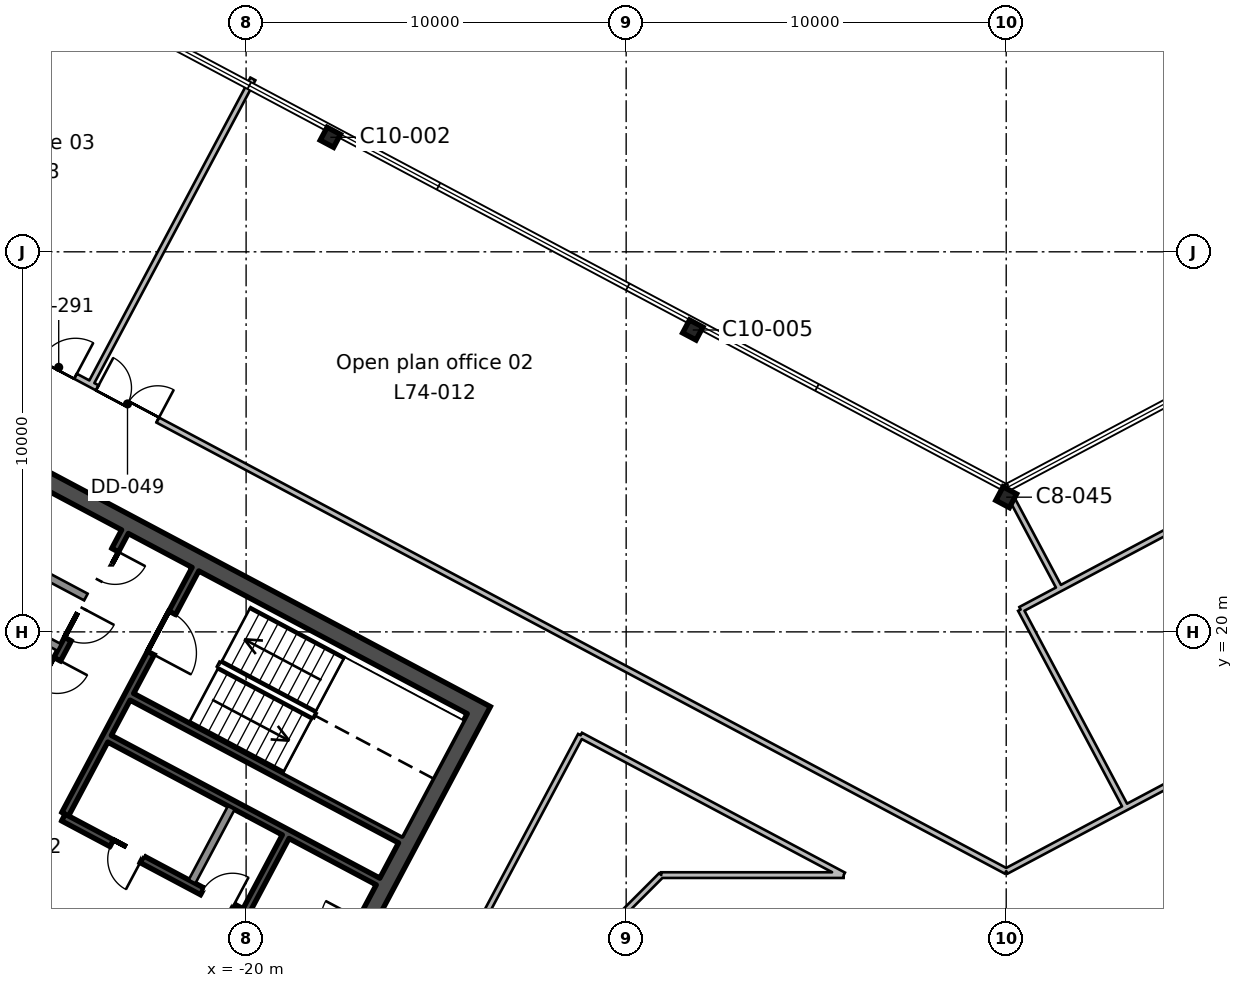
"""IFC4 building model, lengths in metres.
Left out: names, types, materials, properties, quantities, classifications, styles, units other than length and angle.
Written with IfcOpenShell. Run it as: python <this file> out.ifc"""

import sys

from ifc_helpers import new_model, si_unit, direction, frame, frame_2d, origin, origin_2d, place, context, subcontext, project, spatial, rectangle, i_section, extrude, element, fill, save


model = new_model("IFC4")
c1 = context("Model", 3, precision=1e-05, world=origin(), true_north=direction((0.0, 1.0)))
c2 = subcontext(c1, "Body", "Model", "MODEL_VIEW")
j1 = project(units=[si_unit("LENGTHUNIT", "METRE"), si_unit("PLANEANGLEUNIT", "RADIAN")], contexts=[c1])
p1 = place(None, origin())
s1 = spatial("IfcSite", under=j1, at=p1, CompositionType="ELEMENT")
p2 = place(p1, origin())
s2 = spatial("IfcBuilding", under=s1, at=p2, CompositionType="ELEMENT")
p3 = place(p2, frame((0.0, 0.0, 324.3)))
s3 = spatial("IfcBuildingStorey", under=s2, at=p3, CompositionType="ELEMENT", Elevation=324.3)
p4 = place(p3, frame((0.0, 23.544, 0.0), z_axis=(0.0, 0.0, 1.0), x_axis=(-0.882947592859, 0.469471562786, 0.0)))
e1 = element("IfcColumn", 1, at=p4, inside=s3, PredefinedType="COLUMN", context=c2, shape_type="SweptSolid", body=[
    extrude(i_section(OverallWidth=0.404, OverallDepth=0.406, WebThickness=0.027, FlangeThickness=0.044, FilletRadius=0.015, at=origin_2d()), origin(), (0.0, 0.0, 1.0), 3.9),
])
for number, where, z_axis, x_axis in (
    (2, (-8.247, 27.943, 0.0), (0.0, 0.0, 1.0), (-0.883, 0.469, 0.0)),
    (3, (-17.783, 33.013, 0.0), (0.0, 0.0, 1.0), (-0.883, 0.469, 0.0)),
):
    element("IfcColumn", number, at=place(p3, frame(where, z_axis=z_axis, x_axis=x_axis)), inside=s3, PredefinedType="COLUMN", context=c2, shape_type="SweptSolid", body=[
        extrude(i_section(OverallWidth=0.399, OverallDepth=0.386, WebThickness=0.021, FlangeThickness=0.033, FilletRadius=0.015, at=origin_2d()), origin(), (0.0, 0.0, 1.0), 3.9),
    ])
p5 = place(p3, frame((-13.771, 18.138, 0.0), z_axis=(0.0, 0.0, 1.0), x_axis=(-0.469467968382, -0.882949504028, 0.0)))
e4 = element("IfcWall", 4, at=p5, inside=s3, PredefinedType="SHEAR", context=c2, shape_type="SweptSolid", body=[
    extrude(rectangle(XDim=19.1, YDim=0.45, at=frame_2d((9.55, 0.0))), origin(), (0.0, 0.0, 1.0), 3.9),
])
p6 = place(p5, frame((6.55, 0.0, 0.0)))
e5 = element("IfcOpeningElement", 5, at=p6, cuts=e4, PredefinedType="OPENING", context=c2, shape_type="SweptSolid", body=[
    extrude(rectangle(XDim=2.4, YDim=2.4, at=frame_2d((1.2, 1.2))), frame((0.0, 0.235, 0.0), z_axis=(0.0, -1.0, 0.0), x_axis=(1.0, 0.0, 0.0)), (0.0, 0.0, 1.0), 0.47),
])
p7 = place(p3, frame((-14.076, 18.045, 0.0), z_axis=(0.0, 0.0, 1.0), x_axis=(-0.882947755831, 0.46947125628, 0.0)))
e6 = element("IfcWall", 6, at=p7, inside=s3, PredefinedType="SHEAR", context=c2, shape_type="SweptSolid", body=[
    extrude(rectangle(XDim=20.2, YDim=0.45, at=frame_2d((10.1, 0.0))), origin(), (0.0, 0.0, 1.0), 3.9),
])
p8 = place(p3, frame((-18.96, 14.611, 0.0), z_axis=(0.0, 0.0, 1.0), x_axis=(-0.4694473164, -0.882960484464, 0.0)))
e7 = element("IfcWall", 7, at=p8, inside=s3, PredefinedType="SHEAR", context=c2, shape_type="SweptSolid", body=[
    extrude(rectangle(XDim=2.2, YDim=0.2, at=frame_2d((1.1, 0.0))), origin(), (0.0, 0.0, 1.0), 3.9),
])
p9 = place(p3, frame((-20.39, 15.372, 0.0), z_axis=(0.0, 0.0, 1.0), x_axis=(-0.4694473164, -0.882960484464, 0.0)))
e8 = element("IfcWall", 8, at=p9, inside=s3, PredefinedType="SOLIDWALL", context=c2, shape_type="SweptSolid", body=[
    extrude(rectangle(XDim=2.2, YDim=0.2, at=frame_2d((1.1, 0.0))), origin(), (0.0, 0.0, 1.0), 3.9),
])
p10 = place(p3, frame((-21.333, 21.649, 0.0), z_axis=(0.0, 0.0, 1.0), x_axis=(-0.469494272526, -0.882935517501, 0.0)))
e9 = element("IfcWall", 9, at=p10, inside=s3, PredefinedType="SHEAR", context=c2, shape_type="SweptSolid", body=[
    extrude(rectangle(XDim=7.3, YDim=0.2, at=frame_2d((3.65, 0.0))), origin(), (0.0, 0.0, 1.0), 3.9),
])
p11 = place(p10, frame((1.3, 0.0, 0.0)))
e10 = element("IfcOpeningElement", 10, at=p11, cuts=e9, PredefinedType="OPENING", context=c2, shape_type="SweptSolid", body=[
    extrude(rectangle(XDim=1.2, YDim=2.1, at=frame_2d((0.6, 1.05))), frame((0.0, 0.11, 0.0), z_axis=(0.0, -1.0, 0.0), x_axis=(1.0, 0.0, 0.0)), (0.0, 0.0, 1.0), 0.22),
])
p12 = place(p3, frame((-23.188, 22.635, 0.0), z_axis=(0.0, 0.0, 1.0), x_axis=(-0.469454336211, -0.882956752176, 0.0)))
e11 = element("IfcWall", 11, at=p12, inside=s3, PredefinedType="SHEAR", context=c2, shape_type="SweptSolid", body=[
    extrude(rectangle(XDim=7.3, YDim=0.2, at=frame_2d((3.65, 0.0))), origin(), (0.0, 0.0, 1.0), 3.9),
])
p13 = place(p12, frame((0.55, 0.0, 0.0)))
e12 = element("IfcOpeningElement", 12, at=p13, cuts=e11, PredefinedType="OPENING", context=c2, shape_type="SweptSolid", body=[
    extrude(rectangle(XDim=0.9, YDim=2.1, at=frame_2d((0.45, 1.05))), frame((0.0, 0.11, 0.0), z_axis=(0.0, -1.0, 0.0), x_axis=(1.0, 0.0, 0.0)), (0.0, 0.0, 1.0), 0.22),
])
p14 = place(p12, frame((2.3, 0.0, 0.0)))
e13 = element("IfcOpeningElement", 13, at=p14, cuts=e11, PredefinedType="OPENING", context=c2, shape_type="SweptSolid", body=[
    extrude(rectangle(XDim=0.9, YDim=2.1, at=frame_2d((0.45, 1.05))), frame((0.0, 0.11, 0.0), z_axis=(0.0, -1.0, 0.0), x_axis=(1.0, 0.0, 0.0)), (0.0, 0.0, 1.0), 0.22),
])
p15 = place(p12, frame((3.8, 0.0, 0.0)))
e14 = element("IfcOpeningElement", 14, at=p15, cuts=e11, PredefinedType="OPENING", context=c2, shape_type="SweptSolid", body=[
    extrude(rectangle(XDim=0.9, YDim=2.1, at=frame_2d((0.45, 1.05))), frame((0.0, 0.11, 0.0), z_axis=(0.0, -1.0, 0.0), x_axis=(1.0, 0.0, 0.0)), (0.0, 0.0, 1.0), 0.22),
])
p16 = place(p3, frame((-24.215, 20.917, 0.0), z_axis=(0.0, 0.0, 1.0), x_axis=(-0.882964314875, 0.469440111896, 0.0)))
e15 = element("IfcWall", 15, at=p16, inside=s3, PredefinedType="SOLIDWALL", context=c2, shape_type="SweptSolid", body=[
    extrude(rectangle(XDim=5.2, YDim=0.2, at=frame_2d((2.6, 0.0))), origin(), (0.0, 0.0, 1.0), 3.9),
])
p17 = place(p3, frame((-24.919, 19.592, 0.0), z_axis=(0.0, 0.0, 1.0), x_axis=(-0.882953967957, 0.469459572775, 0.0)))
e16 = element("IfcWall", 16, at=p17, inside=s3, PredefinedType="SOLIDWALL", context=c2, shape_type="SweptSolid", body=[
    extrude(rectangle(XDim=5.2, YDim=0.2, at=frame_2d((2.6, 0.0))), origin(), (0.0, 0.0, 1.0), 3.9),
])
p18 = place(p3, frame((-15.942, 14.536, 0.0), z_axis=(0.0, 0.0, 1.0), x_axis=(-0.882946947542, 0.469472776449, 0.0)))
e17 = element("IfcWall", 17, at=p18, inside=s3, PredefinedType="SHEAR", context=c2, shape_type="SweptSolid", body=[
    extrude(rectangle(XDim=8.0, YDim=0.2, at=frame_2d((4.0, 0.0))), origin(), (0.0, 0.0, 1.0), 3.9),
])
p19 = place(p3, frame((-16.529, 13.432, 0.0), z_axis=(0.0, 0.0, 1.0), x_axis=(-0.88295287151, 0.469461634952, 0.0)))
e18 = element("IfcWall", 18, at=p19, inside=s3, PredefinedType="SHEAR", context=c2, shape_type="SweptSolid", body=[
    extrude(rectangle(XDim=8.0, YDim=0.2, at=frame_2d((4.0, 0.0))), origin(), (0.0, 0.0, 1.0), 3.9),
])
p20 = place(p3, frame((-20.04, 12.581, 0.0), z_axis=(0.0, 0.0, 1.0), x_axis=(-0.882942972946, 0.469480251476, 0.0)))
e19 = element("IfcWall", 19, at=p20, inside=s3, PredefinedType="SHEAR", context=c2, shape_type="SweptSolid", body=[
    extrude(rectangle(XDim=5.4, YDim=0.2, at=frame_2d((2.7, 0.0))), origin(), (0.0, 0.0, 1.0), 3.9),
])
p21 = place(p20, frame((0.36, 0.0, 0.0)))
e20 = element("IfcOpeningElement", 20, at=p21, cuts=e19, PredefinedType="OPENING", context=c2, shape_type="SweptSolid", body=[
    extrude(rectangle(XDim=0.9, YDim=2.1, at=frame_2d((0.45, 1.05))), frame((0.0, 0.11, 0.0), z_axis=(0.0, -1.0, 0.0), x_axis=(1.0, 0.0, 0.0)), (0.0, 0.0, 1.0), 0.22),
])
p22 = place(p20, frame((3.06, 0.0, 0.0)))
e21 = element("IfcOpeningElement", 21, at=p22, cuts=e19, PredefinedType="OPENING", context=c2, shape_type="SweptSolid", body=[
    extrude(rectangle(XDim=0.9, YDim=2.1, at=frame_2d((0.45, 1.05))), frame((0.0, 0.11, 0.0), z_axis=(0.0, -1.0, 0.0), x_axis=(1.0, 0.0, 0.0)), (0.0, 0.0, 1.0), 0.22),
])
p23 = place(p3, frame((-19.252, 8.311, 0.0), z_axis=(0.0, 0.0, 1.0), x_axis=(-0.882955722218, 0.469456273365, 0.0)))
e22 = element("IfcWall", 22, at=p23, inside=s3, PredefinedType="SHEAR", context=c2, shape_type="SweptSolid", body=[
    extrude(rectangle(XDim=10.0, YDim=0.2, at=frame_2d((5.0, 0.0))), origin(), (0.0, 0.0, 1.0), 3.9),
])
p24 = place(p23, frame((2.1, 0.0, 0.0)))
e23 = element("IfcOpeningElement", 23, at=p24, cuts=e22, PredefinedType="OPENING", context=c2, shape_type="SweptSolid", body=[
    extrude(rectangle(XDim=1.2, YDim=2.1, at=frame_2d((0.6, 1.05))), frame((0.0, 0.11, 0.0), z_axis=(0.0, -1.0, 0.0), x_axis=(1.0, 0.0, 0.0)), (0.0, 0.0, 1.0), 0.22),
])
p25 = place(p23, frame((5.4, 0.0, 0.0)))
e24 = element("IfcOpeningElement", 24, at=p25, cuts=e22, PredefinedType="OPENING", context=c2, shape_type="SweptSolid", body=[
    extrude(rectangle(XDim=1.1, YDim=2.1, at=frame_2d((0.55, 1.05))), frame((0.0, 0.11, 0.0), z_axis=(0.0, -1.0, 0.0), x_axis=(1.0, 0.0, 0.0)), (0.0, 0.0, 1.0), 0.22),
])
p26 = place(p23, frame((8.1, 0.0, 0.0)))
e25 = element("IfcOpeningElement", 25, at=p26, cuts=e22, PredefinedType="OPENING", context=c2, shape_type="SweptSolid", body=[
    extrude(rectangle(XDim=1.1, YDim=2.1, at=frame_2d((0.55, 1.05))), frame((0.0, 0.11, 0.0), z_axis=(0.0, -1.0, 0.0), x_axis=(1.0, 0.0, 0.0)), (0.0, 0.0, 1.0), 0.22),
])
p27 = place(p3, frame((-48.947, 39.73, 0.0), z_axis=(0.0, 0.0, 1.0), x_axis=(0.882945454821, -0.469475583828, 0.0)))
e26 = element("IfcWall", 26, at=p27, inside=s3, PredefinedType="PARTITIONING", context=c2, shape_type="SweptSolid", body=[
    extrude(rectangle(XDim=55.436, YDim=0.15, at=frame_2d((27.718, 0.0))), origin(), (0.0, 0.0, 1.0), 3.5),
])
p28 = place(p27, frame((28.35, 0.0, 0.0)))
e27 = element("IfcOpeningElement", 27, at=p28, cuts=e26, PredefinedType="OPENING", context=c2, shape_type="SweptSolid", body=[
    extrude(rectangle(XDim=1.8, YDim=2.1, at=frame_2d((0.9, 1.05))), frame((0.0, 0.085, 0.0), z_axis=(0.0, -1.0, 0.0), x_axis=(1.0, 0.0, 0.0)), (0.0, 0.0, 1.0), 0.17),
])
p29 = place(p27, frame((26.7, 0.0, 0.0)))
e28 = element("IfcOpeningElement", 28, at=p29, cuts=e26, PredefinedType="OPENING", context=c2, shape_type="SweptSolid", body=[
    extrude(rectangle(XDim=1.0, YDim=2.1, at=frame_2d((0.5, 1.05))), frame((0.0, 0.085, 0.0), z_axis=(0.0, -1.0, 0.0), x_axis=(1.0, 0.0, 0.0)), (0.0, 0.0, 1.0), 0.17),
])
p30 = place(p27, frame((15.65, 0.0, 0.0)))
e29 = element("IfcOpeningElement", 29, at=p30, cuts=e26, PredefinedType="OPENING", context=c2, shape_type="SweptSolid", body=[
    extrude(rectangle(XDim=1.0, YDim=2.1, at=frame_2d((0.5, 1.05))), frame((0.0, 0.085, 0.0), z_axis=(0.0, -1.0, 0.0), x_axis=(1.0, 0.0, 0.0)), (0.0, 0.0, 1.0), 0.17),
])
p31 = place(p3, frame((0.0, 13.704, 0.0), z_axis=(0.0, 0.0, 1.0), x_axis=(0.882954463269, 0.469458641196, 0.0)))
e30 = element("IfcWall", 30, at=p31, inside=s3, PredefinedType="PARTITIONING", context=c2, shape_type="SweptSolid", body=[
    extrude(rectangle(XDim=33.766, YDim=0.15, at=frame_2d((16.883, 0.0))), origin(), (0.0, 0.0, 1.0), 3.5),
])
p32 = place(p31, frame((15.95, 0.0, 0.0)))
e31 = element("IfcOpeningElement", 31, at=p32, cuts=e30, PredefinedType="OPENING", context=c2, shape_type="SweptSolid", body=[
    extrude(rectangle(XDim=1.8, YDim=2.1, at=frame_2d((0.9, 1.05))), frame((0.0, 0.085, 0.0), z_axis=(0.0, -1.0, 0.0), x_axis=(1.0, 0.0, 0.0)), (0.0, 0.0, 1.0), 0.17),
])
p33 = place(p3, frame((-19.822, 34.55, 0.0), z_axis=(0.0, 0.0, 1.0), x_axis=(-0.46943766298, -0.882965616871, 0.0)))
e32 = element("IfcWall", 32, at=p33, inside=s3, PredefinedType="PARTITIONING", context=c2, shape_type="SweptSolid", body=[
    extrude(rectangle(XDim=9.1, YDim=0.15, at=frame_2d((4.55, 0.0))), origin(), (0.0, 0.0, 1.0), 3.5),
])
p34 = place(p3, frame((2.487, 16.624, 0.0), z_axis=(0.0, 0.0, 1.0), x_axis=(0.469087751625, -0.883151561894, 0.0)))
e33 = element("IfcWall", 33, at=p34, inside=s3, PredefinedType="PARTITIONING", context=c2, shape_type="SweptSolid", body=[
    extrude(rectangle(XDim=1.411, YDim=0.15, at=frame_2d((0.706, 0.0))), origin(), (0.0, 0.0, 1.0), 3.5),
])
p35 = place(p3, frame((0.178, 23.45, 0.0), z_axis=(0.0, 0.0, 1.0), x_axis=(0.469495603372, -0.882934809833, 0.0)))
e34 = element("IfcWall", 34, at=p35, inside=s3, PredefinedType="PARTITIONING", context=c2, shape_type="SweptSolid", body=[
    extrude(rectangle(XDim=2.622, YDim=0.15, at=frame_2d((1.311, 0.0))), origin(), (0.0, 0.0, 1.0), 3.5),
])
p36 = place(p3, frame((1.405, 21.133, 0.0), z_axis=(0.0, 0.0, 1.0), x_axis=(0.882938487938, 0.46948868625, 0.0)))
e35 = element("IfcWall", 35, at=p36, inside=s3, PredefinedType="PARTITIONING", context=c2, shape_type="SweptSolid", body=[
    extrude(rectangle(XDim=22.837, YDim=0.15, at=frame_2d((11.419, 0.0))), origin(), (0.0, 0.0, 1.0), 3.5),
])
p37 = place(p3, frame((2.487, 16.624, 0.0), z_axis=(0.0, 0.0, 1.0), x_axis=(-0.469563370993, 0.882898771447, 0.0)))
e36 = element("IfcWall", 36, at=p37, inside=s3, PredefinedType="PARTITIONING", context=c2, shape_type="SweptSolid", body=[
    extrude(rectangle(XDim=4.49, YDim=0.15, at=frame_2d((2.245, 0.0))), origin(), (0.0, 0.0, 1.0), 3.5),
])
p38 = place(p3, frame((1.405, 21.133, 0.0), z_axis=(0.0, 0.0, 1.0), x_axis=(-0.882753784089, -0.469835882704, 0.0)))
e37 = element("IfcWall", 37, at=p38, inside=s3, PredefinedType="PARTITIONING", context=c2, shape_type="SweptSolid", body=[
    extrude(rectangle(XDim=1.162, YDim=0.15, at=frame_2d((0.581, 0.0))), origin(), (0.0, 0.0, 1.0), 3.5),
])
p39 = place(p3, frame((-20.588, -0.379, 0.0), z_axis=(0.0, 0.0, 1.0), x_axis=(0.469489882812, 0.882937851685, 0.0)))
e38 = element("IfcWall", 38, at=p39, inside=s3, PredefinedType="PARTITIONING", context=c2, shape_type="SweptSolid", body=[
    extrude(rectangle(XDim=20.0, YDim=0.15, at=frame_2d((10.0, 0.0))), origin(), (0.0, 0.0, 1.0), 3.5),
])
p40 = place(p39, frame((9.55, 0.0, 0.0)))
e39 = element("IfcOpeningElement", 39, at=p40, cuts=e38, PredefinedType="OPENING", context=c2, shape_type="SweptSolid", body=[
    extrude(rectangle(XDim=1.0, YDim=2.1, at=frame_2d((0.5, 1.05))), frame((0.0, 0.085, 0.0), z_axis=(0.0, -1.0, 0.0), x_axis=(1.0, 0.0, 0.0)), (0.0, 0.0, 1.0), 0.17),
])
p41 = place(p3, frame((-11.198, 17.28, 0.0), z_axis=(0.0, 0.0, 1.0), x_axis=(0.882946288452, -0.46947401601, 0.0)))
e40 = element("IfcWall", 40, at=p41, inside=s3, PredefinedType="PARTITIONING", context=c2, shape_type="SweptSolid", body=[
    extrude(rectangle(XDim=7.838, YDim=0.15, at=frame_2d((3.919, 0.0))), origin(), (0.0, 0.0, 1.0), 3.5),
])
p42 = place(p3, frame((-4.277, 13.6, 0.0), z_axis=(0.0, 0.0, 1.0), x_axis=(-1.0, 0.0, 0.0)))
e41 = element("IfcWall", 41, at=p42, inside=s3, PredefinedType="PARTITIONING", context=c2, shape_type="SweptSolid", body=[
    extrude(rectangle(XDim=4.8, YDim=0.15, at=frame_2d((2.4, 0.0))), origin(), (0.0, 0.0, 1.0), 3.5),
])
p43 = place(p3, frame((-9.077, 13.6, 0.0), z_axis=(0.0, 0.0, 1.0), x_axis=(-0.707106781187, -0.707106781187, 0.0)))
e42 = element("IfcWall", 42, at=p43, inside=s3, PredefinedType="PARTITIONING", context=c2, shape_type="SweptSolid", body=[
    extrude(rectangle(XDim=6.397, YDim=0.15, at=frame_2d((3.198, 0.0))), origin(), (0.0, 0.0, 1.0), 3.5),
])
p44 = place(p11, origin())
e43 = element("IfcDoor", 43, at=p44, inside=s3, OperationType="SINGLE_SWING_RIGHT", PredefinedType="DOOR", context=c2, shape_type="SweptSolid", body=[
    extrude(rectangle(XDim=1.2, YDim=2.1, at=frame_2d((0.6, 1.05))), frame((0.0, 0.025, 0.0), z_axis=(0.0, -1.0, 0.0), x_axis=(1.0, 0.0, 0.0)), (0.0, 0.0, 1.0), 0.05),
])
fill(e10, e43)
p45 = place(p21, frame((0.9, 0.0, 0.0), z_axis=(0.0, 0.0, 1.0), x_axis=(-1.0, 0.0, 0.0)))
e44 = element("IfcDoor", 44, at=p45, inside=s3, OperationType="SINGLE_SWING_RIGHT", PredefinedType="DOOR", context=c2, shape_type="SweptSolid", body=[
    extrude(rectangle(XDim=0.9, YDim=2.1, at=frame_2d((0.45, 1.05))), frame((0.0, 0.025, 0.0), z_axis=(0.0, -1.0, 0.0), x_axis=(1.0, 0.0, 0.0)), (0.0, 0.0, 1.0), 0.05),
])
fill(e20, e44)
p46 = place(p22, origin())
e45 = element("IfcDoor", 45, at=p46, inside=s3, OperationType="SINGLE_SWING_LEFT", PredefinedType="DOOR", context=c2, shape_type="SweptSolid", body=[
    extrude(rectangle(XDim=0.9, YDim=2.1, at=frame_2d((0.45, 1.05))), frame((0.0, 0.025, 0.0), z_axis=(0.0, -1.0, 0.0), x_axis=(1.0, 0.0, 0.0)), (0.0, 0.0, 1.0), 0.05),
])
fill(e21, e45)
p47 = place(p13, origin())
e46 = element("IfcDoor", 46, at=p47, inside=s3, OperationType="SINGLE_SWING_LEFT", PredefinedType="DOOR", context=c2, shape_type="SweptSolid", body=[
    extrude(rectangle(XDim=0.9, YDim=2.1, at=frame_2d((0.45, 1.05))), frame((0.0, 0.025, 0.0), z_axis=(0.0, -1.0, 0.0), x_axis=(1.0, 0.0, 0.0)), (0.0, 0.0, 1.0), 0.05),
])
fill(e12, e46)
p48 = place(p14, origin())
e47 = element("IfcDoor", 47, at=p48, inside=s3, OperationType="SINGLE_SWING_LEFT", PredefinedType="DOOR", context=c2, shape_type="SweptSolid", body=[
    extrude(rectangle(XDim=0.9, YDim=2.1, at=frame_2d((0.45, 1.05))), frame((0.0, 0.025, 0.0), z_axis=(0.0, -1.0, 0.0), x_axis=(1.0, 0.0, 0.0)), (0.0, 0.0, 1.0), 0.05),
])
fill(e13, e47)
p49 = place(p15, origin())
e48 = element("IfcDoor", 48, at=p49, inside=s3, OperationType="SINGLE_SWING_LEFT", PredefinedType="DOOR", context=c2, shape_type="SweptSolid", body=[
    extrude(rectangle(XDim=0.9, YDim=2.1, at=frame_2d((0.45, 1.05))), frame((0.0, 0.025, 0.0), z_axis=(0.0, -1.0, 0.0), x_axis=(1.0, 0.0, 0.0)), (0.0, 0.0, 1.0), 0.05),
])
fill(e14, e48)
p50 = place(p28, origin())
e49 = element("IfcDoor", 49, at=p50, inside=s3, OperationType="DOUBLE_DOOR_SINGLE_SWING", PredefinedType="DOOR", context=c2, shape_type="SweptSolid", body=[
    extrude(rectangle(XDim=1.8, YDim=2.1, at=frame_2d((0.9, 1.05))), frame((0.0, 0.025, 0.0), z_axis=(0.0, -1.0, 0.0), x_axis=(1.0, 0.0, 0.0)), (0.0, 0.0, 1.0), 0.05),
])
fill(e27, e49)
p51 = place(p29, origin())
e50 = element("IfcDoor", 50, at=p51, inside=s3, OperationType="SINGLE_SWING_RIGHT", PredefinedType="DOOR", context=c2, shape_type="SweptSolid", body=[
    extrude(rectangle(XDim=1.0, YDim=2.1, at=frame_2d((0.5, 1.05))), frame((0.0, 0.025, 0.0), z_axis=(0.0, -1.0, 0.0), x_axis=(1.0, 0.0, 0.0)), (0.0, 0.0, 1.0), 0.05),
])
fill(e28, e50)
save(model, sys.argv[1])
